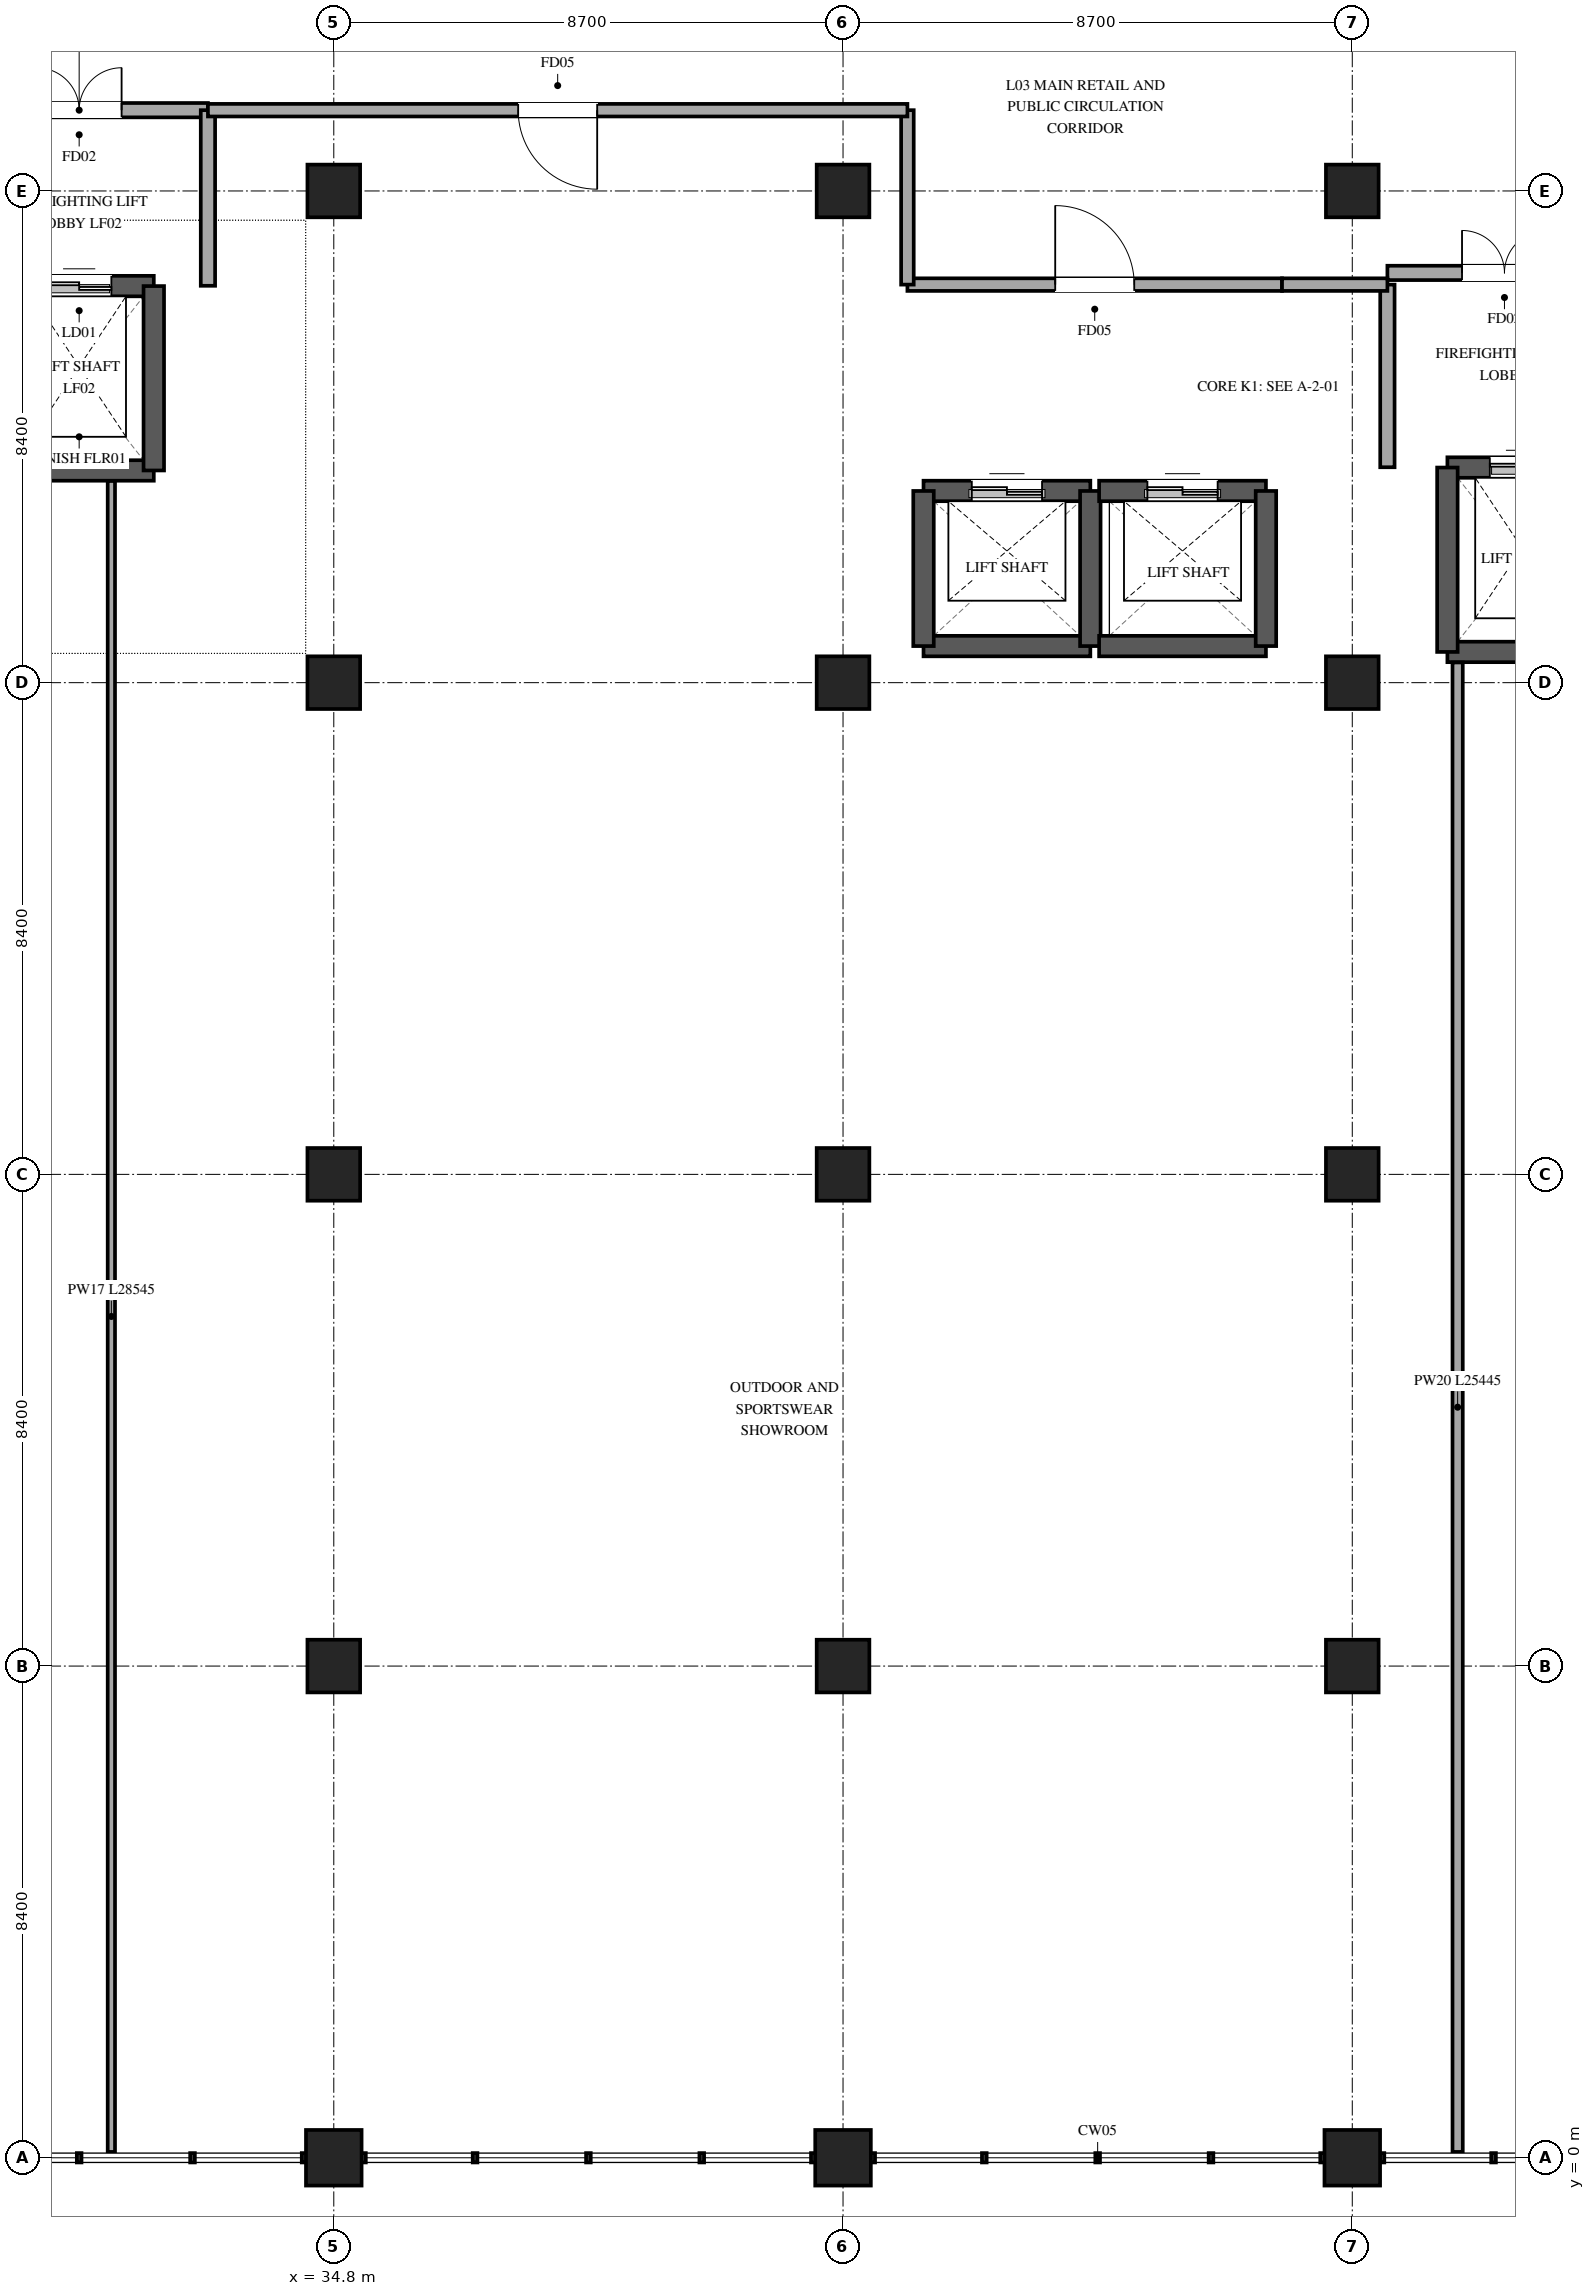
"""IFC4 building model, lengths in metres.
Left out: names, types, materials, properties, quantities, classifications, styles, units other than length and angle.
Written with IfcOpenShell. Run it as: python <this file> out.ifc"""

import sys

from ifc_helpers import new_model, si_unit, direction, frame, frame_2d, origin, origin_2d, place, context, subcontext, project, spatial, rectangle, circle, extrude, element, fill, save


model = new_model("IFC4")
c1 = context("Model", 3, precision=1e-05, world=origin(), true_north=direction((0.0, 1.0)))
c2 = subcontext(c1, "Body", "Model", "MODEL_VIEW")
j1 = project(units=[si_unit("LENGTHUNIT", "METRE"), si_unit("PLANEANGLEUNIT", "RADIAN")], contexts=[c1])
p1 = place(None, origin())
s1 = spatial("IfcSite", under=j1, at=p1, CompositionType="ELEMENT")
p2 = place(p1, origin())
s2 = spatial("IfcBuilding", under=s1, at=p2, CompositionType="ELEMENT")
p3 = place(p2, frame((0.0, 0.0, 11.4)))
s3 = spatial("IfcBuildingStorey", under=s2, at=p3, CompositionType="ELEMENT", Elevation=11.4)
p4 = place(p3, frame((34.8, 0.0, 0.0), z_axis=(0.0, 0.0, 1.0), x_axis=(1.0, 0.0, 0.0)))
e1 = element("IfcColumn", 1, at=p4, inside=s3, PredefinedType="PILASTER", context=c2, shape_type="SweptSolid", body=[
    extrude(circle(Radius=0.475, at=origin_2d()), origin(), (0.0, 0.0, 1.0), 5.1),
])
for number, where, z_axis, x_axis in (
    (2, (34.8, 8.4, 0.0), (0.0, 0.0, 1.0), (1.0, 0.0, 0.0)),
    (3, (34.8, 16.8, 0.0), (0.0, 0.0, 1.0), (1.0, 0.0, 0.0)),
    (4, (34.8, 25.2, 0.0), (0.0, 0.0, 1.0), (1.0, 0.0, 0.0)),
    (5, (34.8, 33.6, 0.0), (0.0, 0.0, 1.0), (1.0, 0.0, 0.0)),
):
    element("IfcColumn", number, at=place(p3, frame(where, z_axis=z_axis, x_axis=x_axis)), inside=s3, PredefinedType="COLUMN", context=c2, shape_type="SweptSolid", body=[
        extrude(rectangle(XDim=0.9, YDim=0.9, at=origin_2d()), origin(), (0.0, 0.0, 1.0), 5.1),
    ])
p5 = place(p3, frame((43.5, 0.0, 0.0), z_axis=(0.0, 0.0, 1.0), x_axis=(1.0, 0.0, 0.0)))
e6 = element("IfcColumn", 6, at=p5, inside=s3, PredefinedType="PILASTER", context=c2, shape_type="SweptSolid", body=[
    extrude(circle(Radius=0.475, at=origin_2d()), origin(), (0.0, 0.0, 1.0), 5.1),
])
for number, where, z_axis, x_axis in (
    (7, (43.5, 8.4, 0.0), (0.0, 0.0, 1.0), (1.0, 0.0, 0.0)),
    (8, (43.5, 16.8, 0.0), (0.0, 0.0, 1.0), (1.0, 0.0, 0.0)),
    (9, (43.5, 25.2, 0.0), (0.0, 0.0, 1.0), (1.0, 0.0, 0.0)),
    (10, (43.5, 33.6, 0.0), (0.0, 0.0, 1.0), (1.0, 0.0, 0.0)),
):
    element("IfcColumn", number, at=place(p3, frame(where, z_axis=z_axis, x_axis=x_axis)), inside=s3, PredefinedType="COLUMN", context=c2, shape_type="SweptSolid", body=[
        extrude(rectangle(XDim=0.9, YDim=0.9, at=origin_2d()), origin(), (0.0, 0.0, 1.0), 5.1),
    ])
p6 = place(p3, frame((52.2, 0.0, 0.0), z_axis=(0.0, 0.0, 1.0), x_axis=(1.0, 0.0, 0.0)))
e11 = element("IfcColumn", 11, at=p6, inside=s3, PredefinedType="PILASTER", context=c2, shape_type="SweptSolid", body=[
    extrude(circle(Radius=0.475, at=origin_2d()), origin(), (0.0, 0.0, 1.0), 5.1),
])
for number, where, z_axis, x_axis in (
    (12, (52.2, 8.4, 0.0), (0.0, 0.0, 1.0), (1.0, 0.0, 0.0)),
    (13, (52.2, 16.8, 0.0), (0.0, 0.0, 1.0), (1.0, 0.0, 0.0)),
    (14, (52.2, 25.2, 0.0), (0.0, 0.0, 1.0), (1.0, 0.0, 0.0)),
    (15, (52.2, 33.6, 0.0), (0.0, 0.0, 1.0), (1.0, 0.0, 0.0)),
):
    element("IfcColumn", number, at=place(p3, frame(where, z_axis=z_axis, x_axis=x_axis)), inside=s3, PredefinedType="COLUMN", context=c2, shape_type="SweptSolid", body=[
        extrude(rectangle(XDim=0.9, YDim=0.9, at=origin_2d()), origin(), (0.0, 0.0, 1.0), 5.1),
    ])
p7 = place(p3, frame((53.825, 28.875, 0.0), z_axis=(0.0, 0.0, 1.0), x_axis=(1.0, 0.0, 0.0)))
e16 = element("IfcWall", 16, at=p7, inside=s3, PredefinedType="SHEAR", context=c2, shape_type="SweptSolid", body=[
    extrude(rectangle(XDim=2.55, YDim=0.35, at=frame_2d((1.275, 0.0))), origin(), (0.0, 0.0, 1.0), 5.1),
])
p8 = place(p7, frame((0.725, 0.0, 0.0)))
e17 = element("IfcOpeningElement", 17, at=p8, cuts=e16, PredefinedType="OPENING", context=c2, shape_type="SweptSolid", body=[
    extrude(rectangle(XDim=1.1, YDim=2.2, at=frame_2d((0.55, 1.1))), frame((0.0, 0.185, 0.0), z_axis=(0.0, -1.0, 0.0), x_axis=(1.0, 0.0, 0.0)), (0.0, 0.0, 1.0), 0.37),
])
p9 = place(p3, frame((56.375, 25.725, 0.0), z_axis=(0.0, 0.0, 1.0), x_axis=(-1.0, 0.0, 0.0)))
e18 = element("IfcWall", 18, at=p9, inside=s3, PredefinedType="SHEAR", context=c2, shape_type="SweptSolid", body=[
    extrude(rectangle(XDim=2.55, YDim=0.35, at=frame_2d((1.275, 0.0))), origin(), (0.0, 0.0, 1.0), 5.1),
])
p10 = place(p3, frame((53.825, 25.725, 0.0), z_axis=(0.0, 0.0, 1.0), x_axis=(0.0, 1.0, 0.0)))
e19 = element("IfcWall", 19, at=p10, inside=s3, PredefinedType="SHEAR", context=c2, shape_type="SweptSolid", body=[
    extrude(rectangle(XDim=3.15, YDim=0.35, at=frame_2d((1.575, 0.0))), origin(), (0.0, 0.0, 1.0), 5.1),
])
p11 = place(p3, frame((29.175, 31.975, 0.0), z_axis=(0.0, 0.0, 1.0), x_axis=(1.0, 0.0, 0.0)))
e20 = element("IfcWall", 20, at=p11, inside=s3, PredefinedType="SHEAR", context=c2, shape_type="SweptSolid", body=[
    extrude(rectangle(XDim=2.55, YDim=0.35, at=frame_2d((1.275, 0.0))), origin(), (0.0, 0.0, 1.0), 5.1),
])
p12 = place(p11, frame((0.725, 0.0, 0.0)))
e21 = element("IfcOpeningElement", 21, at=p12, cuts=e20, PredefinedType="OPENING", context=c2, shape_type="SweptSolid", body=[
    extrude(rectangle(XDim=1.1, YDim=2.2, at=frame_2d((0.55, 1.1))), frame((0.0, 0.185, 0.0), z_axis=(0.0, -1.0, 0.0), x_axis=(1.0, 0.0, 0.0)), (0.0, 0.0, 1.0), 0.37),
])
p13 = place(p3, frame((31.725, 28.825, 0.0), z_axis=(0.0, 0.0, 1.0), x_axis=(-1.0, 0.0, 0.0)))
e22 = element("IfcWall", 22, at=p13, inside=s3, PredefinedType="SHEAR", context=c2, shape_type="SweptSolid", body=[
    extrude(rectangle(XDim=2.55, YDim=0.35, at=frame_2d((1.275, 0.0))), origin(), (0.0, 0.0, 1.0), 5.1),
])
p14 = place(p3, frame((31.725, 31.975, 0.0), z_axis=(0.0, 0.0, 1.0), x_axis=(0.0, -1.0, 0.0)))
e23 = element("IfcWall", 23, at=p14, inside=s3, PredefinedType="SHEAR", context=c2, shape_type="SweptSolid", body=[
    extrude(rectangle(XDim=3.15, YDim=0.35, at=frame_2d((1.575, 0.0))), origin(), (0.0, 0.0, 1.0), 5.1),
])
p15 = place(p3, frame((44.875, 28.475, 0.0), z_axis=(0.0, 0.0, 1.0), x_axis=(1.0, 0.0, 0.0)))
e24 = element("IfcWall", 24, at=p15, inside=s3, PredefinedType="SHEAR", context=c2, shape_type="SweptSolid", body=[
    extrude(rectangle(XDim=2.85, YDim=0.35, at=frame_2d((1.425, 0.0))), origin(), (0.0, 0.0, 1.0), 5.1),
])
p16 = place(p15, frame((0.825, 0.0, 0.0)))
e25 = element("IfcOpeningElement", 25, at=p16, cuts=e24, PredefinedType="OPENING", context=c2, shape_type="SweptSolid", body=[
    extrude(rectangle(XDim=1.2, YDim=2.2, at=frame_2d((0.6, 1.1))), frame((0.0, 0.185, 0.0), z_axis=(0.0, -1.0, 0.0), x_axis=(1.0, 0.0, 0.0)), (0.0, 0.0, 1.0), 0.37),
])
p17 = place(p3, frame((47.725, 25.825, 0.0), z_axis=(0.0, 0.0, 1.0), x_axis=(-1.0, 0.0, 0.0)))
e26 = element("IfcWall", 26, at=p17, inside=s3, PredefinedType="SHEAR", context=c2, shape_type="SweptSolid", body=[
    extrude(rectangle(XDim=2.85, YDim=0.35, at=frame_2d((1.425, 0.0))), origin(), (0.0, 0.0, 1.0), 5.1),
])
for number, where, z_axis, x_axis in (
    (27, (44.875, 25.825, 0.0), (0.0, 0.0, 1.0), (0.0, 1.0, 0.0)),
    (28, (47.725, 28.475, 0.0), (0.0, 0.0, 1.0), (0.0, -1.0, 0.0)),
):
    element("IfcWall", number, at=place(p3, frame(where, z_axis=z_axis, x_axis=x_axis)), inside=s3, PredefinedType="SHEAR", context=c2, shape_type="SweptSolid", body=[
        extrude(rectangle(XDim=2.65, YDim=0.35, at=frame_2d((1.325, 0.0))), origin(), (0.0, 0.0, 1.0), 5.1),
    ])
p18 = place(p3, frame((47.875, 28.475, 0.0), z_axis=(0.0, 0.0, 1.0), x_axis=(1.0, 0.0, 0.0)))
e29 = element("IfcWall", 29, at=p18, inside=s3, PredefinedType="SHEAR", context=c2, shape_type="SweptSolid", body=[
    extrude(rectangle(XDim=2.85, YDim=0.35, at=frame_2d((1.425, 0.0))), origin(), (0.0, 0.0, 1.0), 5.1),
])
p19 = place(p18, frame((0.825, 0.0, 0.0)))
e30 = element("IfcOpeningElement", 30, at=p19, cuts=e29, PredefinedType="OPENING", context=c2, shape_type="SweptSolid", body=[
    extrude(rectangle(XDim=1.2, YDim=2.2, at=frame_2d((0.6, 1.1))), frame((0.0, 0.185, 0.0), z_axis=(0.0, -1.0, 0.0), x_axis=(1.0, 0.0, 0.0)), (0.0, 0.0, 1.0), 0.37),
])
p20 = place(p3, frame((50.725, 25.825, 0.0), z_axis=(0.0, 0.0, 1.0), x_axis=(-1.0, 0.0, 0.0)))
e31 = element("IfcWall", 31, at=p20, inside=s3, PredefinedType="SHEAR", context=c2, shape_type="SweptSolid", body=[
    extrude(rectangle(XDim=2.85, YDim=0.35, at=frame_2d((1.425, 0.0))), origin(), (0.0, 0.0, 1.0), 5.1),
])
p21 = place(p3, frame((50.725, 28.475, 0.0), z_axis=(0.0, 0.0, 1.0), x_axis=(0.0, -1.0, 0.0)))
e32 = element("IfcWall", 32, at=p21, inside=s3, PredefinedType="SHEAR", context=c2, shape_type="SweptSolid", body=[
    extrude(rectangle(XDim=2.65, YDim=0.35, at=frame_2d((1.325, 0.0))), origin(), (0.0, 0.0, 1.0), 5.1),
])
p22 = place(p3, frame((52.8, 32.2, 0.0), z_axis=(0.0, 0.0, 1.0), x_axis=(1.0, 0.0, 0.0)))
e33 = element("IfcWall", 33, at=p22, inside=s3, PredefinedType="STANDARD", context=c2, shape_type="SweptSolid", body=[
    extrude(rectangle(XDim=4.0, YDim=0.245, at=frame_2d((2.0, 0.0))), origin(), (0.0, 0.0, 1.0), 4.76),
])
p23 = place(p22, frame((1.275, 0.0, 0.0)))
e34 = element("IfcOpeningElement", 34, at=p23, cuts=e33, PredefinedType="OPENING", context=c2, shape_type="SweptSolid", body=[
    extrude(rectangle(XDim=1.45, YDim=2.2, at=frame_2d((0.725, 1.1))), frame((0.0, 0.133, 0.0), z_axis=(0.0, -1.0, 0.0), x_axis=(1.0, 0.0, 0.0)), (0.0, 0.0, 1.0), 0.265),
])
p24 = place(p3, frame((52.8, 28.88, 0.0), z_axis=(0.0, 0.0, 1.0), x_axis=(0.0, 1.0, 0.0)))
e35 = element("IfcWall", 35, at=p24, inside=s3, PredefinedType="STANDARD", context=c2, shape_type="SweptSolid", body=[
    extrude(rectangle(XDim=3.12, YDim=0.245, at=frame_2d((1.56, 0.0))), origin(), (0.0, 0.0, 1.0), 4.76),
])
p25 = place(p3, frame((28.25, 34.98, 0.0), z_axis=(0.0, 0.0, 1.0), x_axis=(1.0, 0.0, 0.0)))
e36 = element("IfcWall", 36, at=p25, inside=s3, PredefinedType="STANDARD", context=c2, shape_type="SweptSolid", body=[
    extrude(rectangle(XDim=4.4, YDim=0.245, at=frame_2d((2.2, 0.0))), origin(), (0.0, 0.0, 1.0), 4.76),
])
p26 = place(p25, frame((1.475, 0.0, 0.0)))
e37 = element("IfcOpeningElement", 37, at=p26, cuts=e36, PredefinedType="OPENING", context=c2, shape_type="SweptSolid", body=[
    extrude(rectangle(XDim=1.45, YDim=2.2, at=frame_2d((0.725, 1.1))), frame((0.0, 0.133, 0.0), z_axis=(0.0, -1.0, 0.0), x_axis=(1.0, 0.0, 0.0)), (0.0, 0.0, 1.0), 0.265),
])
p27 = place(p3, frame((32.65, 34.98, 0.0), z_axis=(0.0, 0.0, 1.0), x_axis=(0.0, -1.0, 0.0)))
e38 = element("IfcWall", 38, at=p27, inside=s3, PredefinedType="STANDARD", context=c2, shape_type="SweptSolid", body=[
    extrude(rectangle(XDim=3.0, YDim=0.245, at=frame_2d((1.5, 0.0))), origin(), (0.0, 0.0, 1.0), 4.06),
])
p28 = place(p3, frame((44.6, 32.0, 0.0), z_axis=(0.0, 0.0, 1.0), x_axis=(1.0, 0.0, 0.0)))
e39 = element("IfcWall", 39, at=p28, inside=s3, PredefinedType="PARTITIONING", context=c2, shape_type="SweptSolid", body=[
    extrude(rectangle(XDim=6.4, YDim=0.215, at=frame_2d((3.2, 0.0))), origin(), (0.0, 0.0, 1.0), 4.76),
])
p29 = place(p28, frame((2.525, 0.0, 0.0)))
e40 = element("IfcOpeningElement", 40, at=p29, cuts=e39, PredefinedType="OPENING", context=c2, shape_type="SweptSolid", body=[
    extrude(rectangle(XDim=1.35, YDim=2.2, at=frame_2d((0.675, 1.1))), frame((0.0, 0.118, 0.0), z_axis=(0.0, -1.0, 0.0), x_axis=(1.0, 0.0, 0.0)), (0.0, 0.0, 1.0), 0.235),
])
p30 = place(p3, frame((44.6, 32.0, 0.0), z_axis=(0.0, 0.0, 1.0), x_axis=(0.0, 1.0, 0.0)))
e41 = element("IfcWall", 41, at=p30, inside=s3, PredefinedType="PARTITIONING", context=c2, shape_type="SweptSolid", body=[
    extrude(rectangle(XDim=2.98, YDim=0.215, at=frame_2d((1.49, 0.0))), origin(), (0.0, 0.0, 1.0), 4.06),
])
p31 = place(p3, frame((44.6, 34.98, 0.0), z_axis=(0.0, 0.0, 1.0), x_axis=(-1.0, 0.0, 0.0)))
e42 = element("IfcWall", 42, at=p31, inside=s3, PredefinedType="PARTITIONING", context=c2, shape_type="SweptSolid", body=[
    extrude(rectangle(XDim=11.95, YDim=0.215, at=frame_2d((5.975, 0.0))), origin(), (0.0, 0.0, 1.0), 4.06),
])
p32 = place(p31, frame((5.3, 0.0, 0.0)))
e43 = element("IfcOpeningElement", 43, at=p32, cuts=e42, PredefinedType="OPENING", context=c2, shape_type="SweptSolid", body=[
    extrude(rectangle(XDim=1.35, YDim=2.2, at=frame_2d((0.675, 1.1))), frame((0.0, 0.118, 0.0), z_axis=(0.0, -1.0, 0.0), x_axis=(1.0, 0.0, 0.0)), (0.0, 0.0, 1.0), 0.235),
])
p33 = place(p3, frame((52.8, 32.0, 0.0), z_axis=(0.0, 0.0, 1.0), x_axis=(-1.0, 0.0, 0.0)))
e44 = element("IfcWall", 44, at=p33, inside=s3, PredefinedType="PARTITIONING", context=c2, shape_type="SweptSolid", body=[
    extrude(rectangle(XDim=1.8, YDim=0.215, at=frame_2d((0.9, 0.0))), origin(), (0.0, 0.0, 1.0), 4.06),
])
p34 = place(p3, frame((31.0, 28.645, 0.0), z_axis=(0.0, 0.0, 1.0), x_axis=(0.0, -1.0, 0.0)))
e45 = element("IfcWall", 45, at=p34, inside=s3, PredefinedType="PARTITIONING", context=c2, shape_type="SweptSolid", body=[
    extrude(rectangle(XDim=28.545, YDim=0.125, at=frame_2d((14.272, 0.0))), origin(), (0.0, 0.0, 1.0), 4.06),
])
p35 = place(p3, frame((54.0, 25.545, 0.0), z_axis=(0.0, 0.0, 1.0), x_axis=(0.0, -1.0, 0.0)))
e46 = element("IfcWall", 46, at=p35, inside=s3, PredefinedType="PARTITIONING", context=c2, shape_type="SweptSolid", body=[
    extrude(rectangle(XDim=25.445, YDim=0.175, at=frame_2d((12.722, 0.0))), origin(), (0.0, 0.0, 1.0), 4.06),
])
p36 = place(p8, origin())
e47 = element("IfcDoor", 47, at=p36, inside=s3, OperationType="DOUBLE_DOOR_SLIDING", PredefinedType="DOOR", context=c2, shape_type="SweptSolid", body=[
    extrude(rectangle(XDim=1.1, YDim=2.2, at=frame_2d((0.55, 1.1))), frame((0.0, 0.025, 0.0), z_axis=(0.0, -1.0, 0.0), x_axis=(1.0, 0.0, 0.0)), (0.0, 0.0, 1.0), 0.05),
])
fill(e17, e47)
p37 = place(p12, origin())
e48 = element("IfcDoor", 48, at=p37, inside=s3, OperationType="DOUBLE_DOOR_SLIDING", PredefinedType="DOOR", context=c2, shape_type="SweptSolid", body=[
    extrude(rectangle(XDim=1.1, YDim=2.2, at=frame_2d((0.55, 1.1))), frame((0.0, 0.025, 0.0), z_axis=(0.0, -1.0, 0.0), x_axis=(1.0, 0.0, 0.0)), (0.0, 0.0, 1.0), 0.05),
])
fill(e21, e48)
p38 = place(p16, origin())
e49 = element("IfcDoor", 49, at=p38, inside=s3, OperationType="DOUBLE_DOOR_SLIDING", PredefinedType="DOOR", context=c2, shape_type="SweptSolid", body=[
    extrude(rectangle(XDim=1.2, YDim=2.2, at=frame_2d((0.6, 1.1))), frame((0.0, 0.025, 0.0), z_axis=(0.0, -1.0, 0.0), x_axis=(1.0, 0.0, 0.0)), (0.0, 0.0, 1.0), 0.05),
])
fill(e25, e49)
p39 = place(p19, origin())
e50 = element("IfcDoor", 50, at=p39, inside=s3, OperationType="DOUBLE_DOOR_SLIDING", PredefinedType="DOOR", context=c2, shape_type="SweptSolid", body=[
    extrude(rectangle(XDim=1.2, YDim=2.2, at=frame_2d((0.6, 1.1))), frame((0.0, 0.025, 0.0), z_axis=(0.0, -1.0, 0.0), x_axis=(1.0, 0.0, 0.0)), (0.0, 0.0, 1.0), 0.05),
])
fill(e30, e50)
p40 = place(p23, origin())
e51 = element("IfcDoor", 51, at=p40, inside=s3, OperationType="DOUBLE_DOOR_SINGLE_SWING", PredefinedType="DOOR", context=c2, shape_type="SweptSolid", body=[
    extrude(rectangle(XDim=1.45, YDim=2.2, at=frame_2d((0.725, 1.1))), frame((0.0, 0.025, 0.0), z_axis=(0.0, -1.0, 0.0), x_axis=(1.0, 0.0, 0.0)), (0.0, 0.0, 1.0), 0.05),
])
fill(e34, e51)
p41 = place(p26, origin())
e52 = element("IfcDoor", 52, at=p41, inside=s3, OperationType="DOUBLE_DOOR_SINGLE_SWING", PredefinedType="DOOR", context=c2, shape_type="SweptSolid", body=[
    extrude(rectangle(XDim=1.45, YDim=2.2, at=frame_2d((0.725, 1.1))), frame((0.0, 0.025, 0.0), z_axis=(0.0, -1.0, 0.0), x_axis=(1.0, 0.0, 0.0)), (0.0, 0.0, 1.0), 0.05),
])
fill(e37, e52)
p42 = place(p29, origin())
e53 = element("IfcDoor", 53, at=p42, inside=s3, OperationType="SINGLE_SWING_LEFT", PredefinedType="DOOR", context=c2, shape_type="SweptSolid", body=[
    extrude(rectangle(XDim=1.35, YDim=2.2, at=frame_2d((0.675, 1.1))), frame((0.0, 0.025, 0.0), z_axis=(0.0, -1.0, 0.0), x_axis=(1.0, 0.0, 0.0)), (0.0, 0.0, 1.0), 0.05),
])
fill(e40, e53)
p43 = place(p32, origin())
e54 = element("IfcDoor", 54, at=p43, inside=s3, OperationType="SINGLE_SWING_LEFT", PredefinedType="DOOR", context=c2, shape_type="SweptSolid", body=[
    extrude(rectangle(XDim=1.35, YDim=2.2, at=frame_2d((0.675, 1.1))), frame((0.0, 0.025, 0.0), z_axis=(0.0, -1.0, 0.0), x_axis=(1.0, 0.0, 0.0)), (0.0, 0.0, 1.0), 0.05),
])
fill(e43, e54)
save(model, sys.argv[1])
